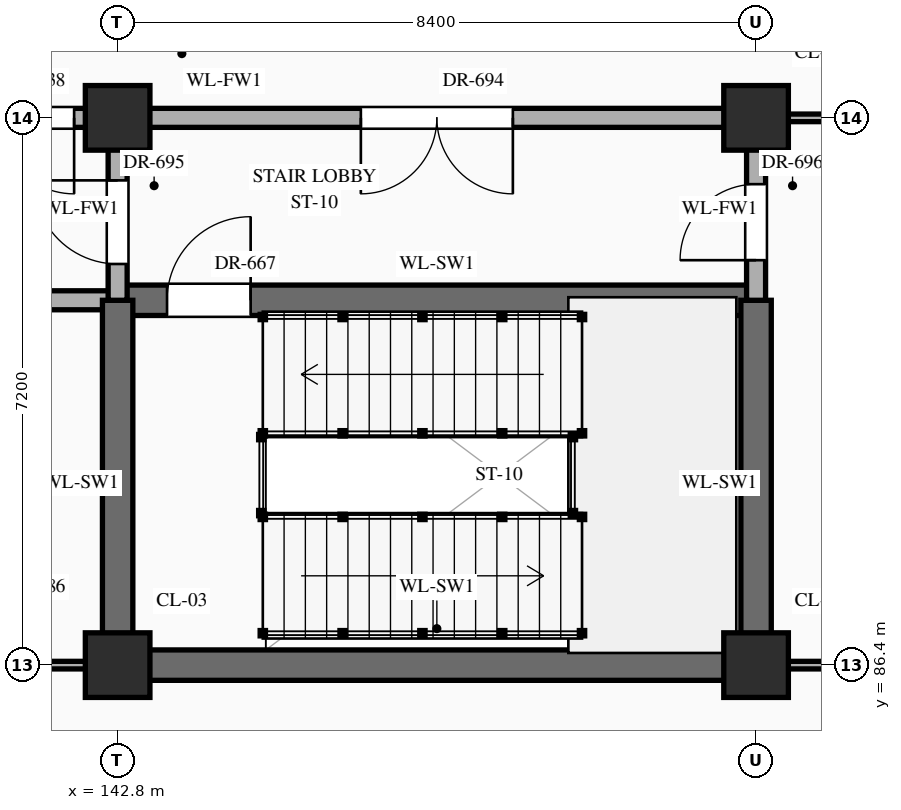
"""IFC4 building model, lengths in metres.
Left out: names, types, materials, properties, quantities, classifications, styles, units other than length and angle.
Written with IfcOpenShell. Run it as: python <this file> out.ifc"""

import sys

from ifc_helpers import new_model, si_unit, direction, frame, frame_2d, origin, origin_2d, place, context, subcontext, project, spatial, rectangle, extrude, element, fill, save


model = new_model("IFC4")
c1 = context("Model", 3, precision=1e-05, world=origin(), true_north=direction((0.0, 1.0)))
c2 = subcontext(c1, "Body", "Model", "MODEL_VIEW")
j1 = project(units=[si_unit("LENGTHUNIT", "METRE"), si_unit("PLANEANGLEUNIT", "RADIAN")], contexts=[c1])
p1 = place(None, origin())
s1 = spatial("IfcSite", under=j1, at=p1, CompositionType="ELEMENT")
p2 = place(p1, origin())
s2 = spatial("IfcBuilding", under=s1, at=p2, CompositionType="ELEMENT")
p3 = place(p2, origin())
s3 = spatial("IfcBuildingStorey", under=s2, at=p3, CompositionType="ELEMENT", Elevation=0.0)
for number, where, z_axis, x_axis in (
    (1, (142.8, 86.4, 0.0), (0.0, 0.0, 1.0), (1.0, 0.0, 0.0)),
    (2, (142.8, 93.6, 0.0), (0.0, 0.0, 1.0), (1.0, 0.0, 0.0)),
    (3, (151.2, 86.4, 0.0), (0.0, 0.0, 1.0), (1.0, 0.0, 0.0)),
    (4, (151.2, 93.6, 0.0), (0.0, 0.0, 1.0), (1.0, 0.0, 0.0)),
):
    element("IfcColumn", number, at=place(p3, frame(where, z_axis=z_axis, x_axis=x_axis)), inside=s3, PredefinedType="COLUMN", context=c2, shape_type="SweptSolid", body=[
        extrude(rectangle(XDim=0.85, YDim=0.85, at=origin_2d()), origin(), (0.0, 0.0, 1.0), 5.4),
    ])
p4 = place(p3, frame((140.0, 86.4, 0.0), z_axis=(0.0, 0.0, 1.0), x_axis=(1.0, 0.0, 0.0)))
e5 = element("IfcWall", 5, at=p4, inside=s3, PredefinedType="STANDARD", context=c2, shape_type="SweptSolid", body=[
    extrude(rectangle(XDim=2.8, YDim=0.1, at=frame_2d((1.4, 0.0))), origin(), (0.0, 0.0, 1.0), 4.27),
])
p5 = place(p4, frame((0.748, 0.0, 0.0)))
e6 = element("IfcOpeningElement", 6, at=p5, cuts=e5, PredefinedType="OPENING", context=c2, shape_type="SweptSolid", body=[
    extrude(rectangle(XDim=0.96, YDim=2.2, at=frame_2d((0.48, 1.1))), frame((0.0, 0.062, 0.0), z_axis=(0.0, -1.0, 0.0), x_axis=(1.0, 0.0, 0.0)), (0.0, 0.0, 1.0), 0.124),
])
p6 = place(p3, frame((142.8, 86.4, 0.0), z_axis=(0.0, 0.0, 1.0), x_axis=(1.0, 0.0, 0.0)))
e7 = element("IfcWall", 7, at=p6, inside=s3, PredefinedType="SHEAR", context=c2, shape_type="SweptSolid", body=[
    extrude(rectangle(XDim=8.4, YDim=0.4, at=frame_2d((4.2, 0.0))), origin(), (0.0, 0.0, 1.0), 5.12),
])
p7 = place(p3, frame((151.2, 86.4, 0.0), z_axis=(0.0, 0.0, 1.0), x_axis=(1.0, 0.0, 0.0)))
e8 = element("IfcWall", 8, at=p7, inside=s3, PredefinedType="STANDARD", context=c2, shape_type="SweptSolid", body=[
    extrude(rectangle(XDim=16.76, YDim=0.1, at=frame_2d((8.38, 0.0))), origin(), (0.0, 0.0, 1.0), 4.27),
])
p8 = place(p7, frame((3.7, 0.0, 0.0)))
e9 = element("IfcOpeningElement", 9, at=p8, cuts=e8, PredefinedType="OPENING", context=c2, shape_type="SweptSolid", body=[
    extrude(rectangle(XDim=1.0, YDim=2.25, at=frame_2d((0.5, 1.125))), frame((0.0, 0.062, 0.0), z_axis=(0.0, -1.0, 0.0), x_axis=(1.0, 0.0, 0.0)), (0.0, 0.0, 1.0), 0.124),
])
p9 = place(p7, frame((9.433, 0.0, 0.0)))
e10 = element("IfcOpeningElement", 10, at=p9, cuts=e8, PredefinedType="OPENING", context=c2, shape_type="SweptSolid", body=[
    extrude(rectangle(XDim=1.08, YDim=2.25, at=frame_2d((0.54, 1.125))), frame((0.0, 0.062, 0.0), z_axis=(0.0, -1.0, 0.0), x_axis=(1.0, 0.0, 0.0)), (0.0, 0.0, 1.0), 0.124),
])
p10 = place(p7, frame((12.02, 0.0, 0.0)))
e11 = element("IfcOpeningElement", 11, at=p10, cuts=e8, PredefinedType="OPENING", context=c2, shape_type="SweptSolid", body=[
    extrude(rectangle(XDim=1.16, YDim=2.3, at=frame_2d((0.58, 1.15))), frame((0.0, 0.062, 0.0), z_axis=(0.0, -1.0, 0.0), x_axis=(1.0, 0.0, 0.0)), (0.0, 0.0, 1.0), 0.124),
])
p11 = place(p7, frame((14.627, 0.0, 0.0)))
e12 = element("IfcOpeningElement", 12, at=p11, cuts=e8, PredefinedType="OPENING", context=c2, shape_type="SweptSolid", body=[
    extrude(rectangle(XDim=1.2, YDim=2.35, at=frame_2d((0.6, 1.175))), frame((0.0, 0.062, 0.0), z_axis=(0.0, -1.0, 0.0), x_axis=(1.0, 0.0, 0.0)), (0.0, 0.0, 1.0), 0.124),
])
p12 = place(p3, frame((140.0, 91.2, 0.0), z_axis=(0.0, 0.0, 1.0), x_axis=(1.0, 0.0, 0.0)))
e13 = element("IfcWall", 13, at=p12, inside=s3, PredefinedType="STANDARD", context=c2, shape_type="SweptSolid", body=[
    extrude(rectangle(XDim=2.8, YDim=0.25, at=frame_2d((1.4, 0.0))), origin(), (0.0, 0.0, 1.0), 5.12),
])
p13 = place(p3, frame((142.8, 91.2, 0.0), z_axis=(0.0, 0.0, 1.0), x_axis=(1.0, 0.0, 0.0)))
e14 = element("IfcWall", 14, at=p13, inside=s3, PredefinedType="SHEAR", context=c2, shape_type="SweptSolid", body=[
    extrude(rectangle(XDim=8.4, YDim=0.4, at=frame_2d((4.2, 0.0))), origin(), (0.0, 0.0, 1.0), 5.12),
])
p14 = place(p13, frame((0.65, 0.0, 0.0)))
e15 = element("IfcOpeningElement", 15, at=p14, cuts=e14, PredefinedType="OPENING", context=c2, shape_type="SweptSolid", body=[
    extrude(rectangle(XDim=1.1, YDim=2.2, at=frame_2d((0.55, 1.1))), frame((0.0, 0.212, 0.0), z_axis=(0.0, -1.0, 0.0), x_axis=(1.0, 0.0, 0.0)), (0.0, 0.0, 1.0), 0.424),
])
p15 = place(p3, frame((137.2, 93.6, 0.0), z_axis=(0.0, 0.0, 1.0), x_axis=(1.0, 0.0, 0.0)))
e16 = element("IfcWall", 16, at=p15, inside=s3, PredefinedType="STANDARD", context=c2, shape_type="SweptSolid", body=[
    extrude(rectangle(XDim=14.0, YDim=0.25, at=frame_2d((7.0, 0.0))), origin(), (0.0, 0.0, 1.0), 4.27),
])
p16 = place(p15, frame((8.8, 0.0, 0.0)))
e17 = element("IfcOpeningElement", 17, at=p16, cuts=e16, PredefinedType="OPENING", context=c2, shape_type="SweptSolid", body=[
    extrude(rectangle(XDim=2.0, YDim=2.4, at=frame_2d((1.0, 1.2))), frame((0.0, 0.137, 0.0), z_axis=(0.0, -1.0, 0.0), x_axis=(1.0, 0.0, 0.0)), (0.0, 0.0, 1.0), 0.274),
])
p17 = place(p15, frame((0.65, 0.0, 0.0)))
e18 = element("IfcOpeningElement", 18, at=p17, cuts=e16, PredefinedType="OPENING", context=c2, shape_type="SweptSolid", body=[
    extrude(rectangle(XDim=1.5, YDim=2.25, at=frame_2d((0.75, 1.125))), frame((0.0, 0.137, 0.0), z_axis=(0.0, -1.0, 0.0), x_axis=(1.0, 0.0, 0.0)), (0.0, 0.0, 1.0), 0.274),
])
p18 = place(p15, frame((3.028, 0.0, 0.0)))
e19 = element("IfcOpeningElement", 19, at=p18, cuts=e16, PredefinedType="OPENING", context=c2, shape_type="SweptSolid", body=[
    extrude(rectangle(XDim=2.0, YDim=2.4, at=frame_2d((1.0, 1.2))), frame((0.0, 0.137, 0.0), z_axis=(0.0, -1.0, 0.0), x_axis=(1.0, 0.0, 0.0)), (0.0, 0.0, 1.0), 0.274),
])
p19 = place(p3, frame((151.2, 93.6, 0.0), z_axis=(0.0, 0.0, 1.0), x_axis=(1.0, 0.0, 0.0)))
e20 = element("IfcWall", 20, at=p19, inside=s3, PredefinedType="STANDARD", context=c2, shape_type="SweptSolid", body=[
    extrude(rectangle(XDim=16.76, YDim=0.1, at=frame_2d((8.38, 0.0))), origin(), (0.0, 0.0, 1.0), 4.27),
])
p20 = place(p19, frame((3.64, 0.0, 0.0)))
e21 = element("IfcOpeningElement", 21, at=p20, cuts=e20, PredefinedType="OPENING", context=c2, shape_type="SweptSolid", body=[
    extrude(rectangle(XDim=1.12, YDim=2.25, at=frame_2d((0.56, 1.125))), frame((0.0, 0.062, 0.0), z_axis=(0.0, -1.0, 0.0), x_axis=(1.0, 0.0, 0.0)), (0.0, 0.0, 1.0), 0.124),
])
p21 = place(p19, frame((9.393, 0.0, 0.0)))
e22 = element("IfcOpeningElement", 22, at=p21, cuts=e20, PredefinedType="OPENING", context=c2, shape_type="SweptSolid", body=[
    extrude(rectangle(XDim=1.16, YDim=2.3, at=frame_2d((0.58, 1.15))), frame((0.0, 0.062, 0.0), z_axis=(0.0, -1.0, 0.0), x_axis=(1.0, 0.0, 0.0)), (0.0, 0.0, 1.0), 0.124),
])
p22 = place(p19, frame((12.0, 0.0, 0.0)))
e23 = element("IfcOpeningElement", 23, at=p22, cuts=e20, PredefinedType="OPENING", context=c2, shape_type="SweptSolid", body=[
    extrude(rectangle(XDim=1.2, YDim=2.35, at=frame_2d((0.6, 1.175))), frame((0.0, 0.062, 0.0), z_axis=(0.0, -1.0, 0.0), x_axis=(1.0, 0.0, 0.0)), (0.0, 0.0, 1.0), 0.124),
])
p23 = place(p19, frame((14.607, 0.0, 0.0)))
e24 = element("IfcOpeningElement", 24, at=p23, cuts=e20, PredefinedType="OPENING", context=c2, shape_type="SweptSolid", body=[
    extrude(rectangle(XDim=1.24, YDim=2.3, at=frame_2d((0.62, 1.15))), frame((0.0, 0.062, 0.0), z_axis=(0.0, -1.0, 0.0), x_axis=(1.0, 0.0, 0.0)), (0.0, 0.0, 1.0), 0.124),
])
p24 = place(p3, frame((142.8, 86.4, 0.0), z_axis=(0.0, 0.0, 1.0), x_axis=(0.0, 1.0, 0.0)))
e25 = element("IfcWall", 25, at=p24, inside=s3, PredefinedType="SHEAR", context=c2, shape_type="SweptSolid", body=[
    extrude(rectangle(XDim=4.8, YDim=0.4, at=frame_2d((2.4, 0.0))), origin(), (0.0, 0.0, 1.0), 5.12),
])
p25 = place(p3, frame((142.8, 91.2, 0.0), z_axis=(0.0, 0.0, 1.0), x_axis=(0.0, 1.0, 0.0)))
e26 = element("IfcWall", 26, at=p25, inside=s3, PredefinedType="STANDARD", context=c2, shape_type="SweptSolid", body=[
    extrude(rectangle(XDim=2.4, YDim=0.25, at=frame_2d((1.2, 0.0))), origin(), (0.0, 0.0, 1.0), 4.37),
])
p26 = place(p25, frame((0.478, 0.0, 0.0)))
e27 = element("IfcOpeningElement", 27, at=p26, cuts=e26, PredefinedType="OPENING", context=c2, shape_type="SweptSolid", body=[
    extrude(rectangle(XDim=1.1, YDim=2.2, at=frame_2d((0.55, 1.1))), frame((0.0, 0.137, 0.0), z_axis=(0.0, -1.0, 0.0), x_axis=(1.0, 0.0, 0.0)), (0.0, 0.0, 1.0), 0.274),
])
p27 = place(p3, frame((151.2, 86.4, 0.0), z_axis=(0.0, 0.0, 1.0), x_axis=(0.0, 1.0, 0.0)))
e28 = element("IfcWall", 28, at=p27, inside=s3, PredefinedType="SHEAR", context=c2, shape_type="SweptSolid", body=[
    extrude(rectangle(XDim=4.8, YDim=0.4, at=frame_2d((2.4, 0.0))), origin(), (0.0, 0.0, 1.0), 5.12),
])
p28 = place(p3, frame((151.2, 91.2, 0.0), z_axis=(0.0, 0.0, 1.0), x_axis=(0.0, 1.0, 0.0)))
e29 = element("IfcWall", 29, at=p28, inside=s3, PredefinedType="STANDARD", context=c2, shape_type="SweptSolid", body=[
    extrude(rectangle(XDim=2.4, YDim=0.25, at=frame_2d((1.2, 0.0))), origin(), (0.0, 0.0, 1.0), 4.37),
])
p29 = place(p28, frame((0.528, 0.0, 0.0)))
e30 = element("IfcOpeningElement", 30, at=p29, cuts=e29, PredefinedType="OPENING", context=c2, shape_type="SweptSolid", body=[
    extrude(rectangle(XDim=1.0, YDim=2.2, at=frame_2d((0.5, 1.1))), frame((0.0, 0.137, 0.0), z_axis=(0.0, -1.0, 0.0), x_axis=(1.0, 0.0, 0.0)), (0.0, 0.0, 1.0), 0.274),
])
p30 = place(p14, origin())
e31 = element("IfcDoor", 31, at=p30, inside=s3, OperationType="SINGLE_SWING_RIGHT", PredefinedType="DOOR", context=c2, shape_type="SweptSolid", body=[
    extrude(rectangle(XDim=1.1, YDim=2.2, at=frame_2d((0.55, 1.1))), frame((0.0, 0.025, 0.0), z_axis=(0.0, -1.0, 0.0), x_axis=(1.0, 0.0, 0.0)), (0.0, 0.0, 1.0), 0.05),
])
fill(e15, e31)
p31 = place(p16, frame((2.0, 0.0, 0.0), z_axis=(0.0, 0.0, 1.0), x_axis=(-1.0, 0.0, 0.0)))
e32 = element("IfcDoor", 32, at=p31, inside=s3, OperationType="DOUBLE_DOOR_SINGLE_SWING", PredefinedType="DOOR", context=c2, shape_type="SweptSolid", body=[
    extrude(rectangle(XDim=2.0, YDim=2.4, at=frame_2d((1.0, 1.2))), frame((0.0, 0.025, 0.0), z_axis=(0.0, -1.0, 0.0), x_axis=(1.0, 0.0, 0.0)), (0.0, 0.0, 1.0), 0.05),
])
fill(e17, e32)
p32 = place(p26, origin())
e33 = element("IfcDoor", 33, at=p32, inside=s3, OperationType="SINGLE_SWING_RIGHT", PredefinedType="DOOR", context=c2, shape_type="SweptSolid", body=[
    extrude(rectangle(XDim=1.1, YDim=2.2, at=frame_2d((0.55, 1.1))), frame((0.0, 0.025, 0.0), z_axis=(0.0, -1.0, 0.0), x_axis=(1.0, 0.0, 0.0)), (0.0, 0.0, 1.0), 0.05),
])
fill(e27, e33)
p33 = place(p29, origin())
e34 = element("IfcDoor", 34, at=p33, inside=s3, OperationType="SINGLE_SWING_LEFT", PredefinedType="DOOR", context=c2, shape_type="SweptSolid", body=[
    extrude(rectangle(XDim=1.0, YDim=2.2, at=frame_2d((0.5, 1.1))), frame((0.0, 0.025, 0.0), z_axis=(0.0, -1.0, 0.0), x_axis=(1.0, 0.0, 0.0)), (0.0, 0.0, 1.0), 0.05),
])
fill(e30, e34)
p34 = place(p18, frame((2.0, 0.0, 0.0), z_axis=(0.0, 0.0, 1.0), x_axis=(-1.0, 0.0, 0.0)))
e35 = element("IfcDoor", 35, at=p34, inside=s3, OperationType="DOUBLE_DOOR_SINGLE_SWING", PredefinedType="DOOR", context=c2, shape_type="SweptSolid", body=[
    extrude(rectangle(XDim=2.0, YDim=2.4, at=frame_2d((1.0, 1.2))), frame((0.0, 0.025, 0.0), z_axis=(0.0, -1.0, 0.0), x_axis=(1.0, 0.0, 0.0)), (0.0, 0.0, 1.0), 0.05),
])
fill(e19, e35)
save(model, sys.argv[1])
